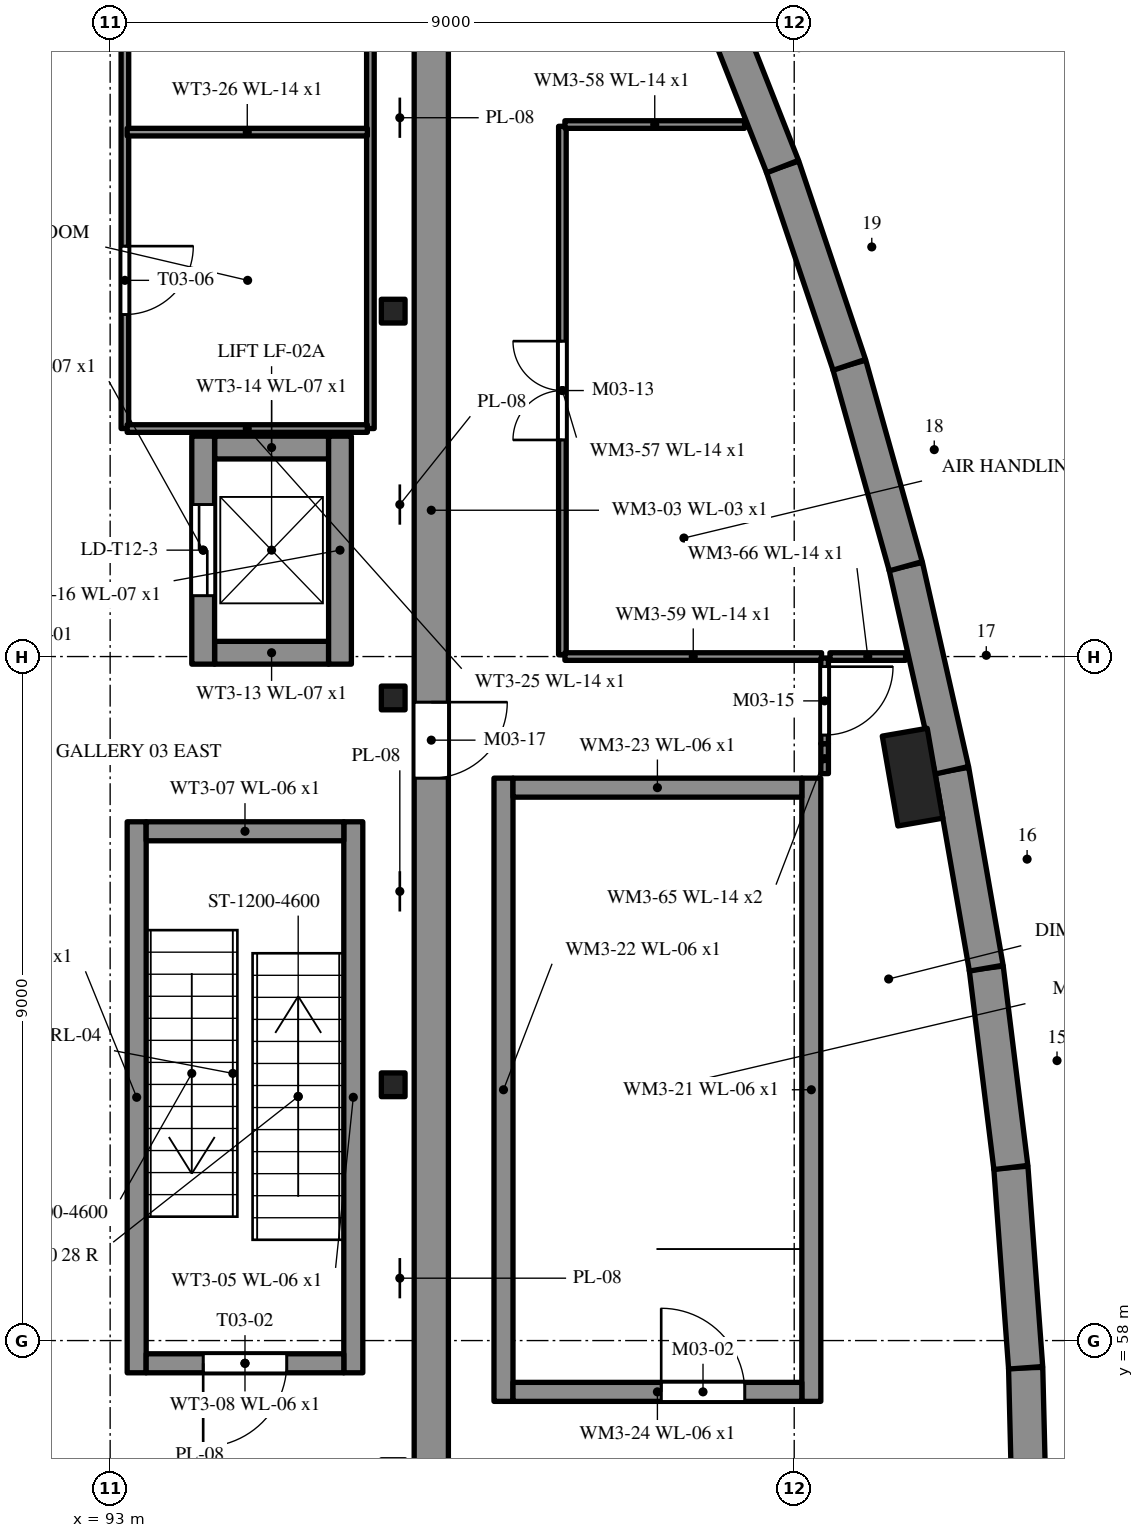
"""IFC4 building model, lengths in metres.
Left out: names, types, materials, properties, quantities, classifications, styles, units other than length and angle.
Written with IfcOpenShell. Run it as: python <this file> out.ifc"""

import sys

from ifc_helpers import new_model, si_unit, direction, frame, frame_2d, origin, origin_2d, place, context, subcontext, project, spatial, polyline, rectangle, i_section, outline, extrude, element, fill, save


model = new_model("IFC4")
c1 = context("Model", 3, precision=1e-05, world=origin(), true_north=direction((0.0, 1.0)))
c2 = subcontext(c1, "Body", "Model", "MODEL_VIEW")
j1 = project(units=[si_unit("LENGTHUNIT", "METRE"), si_unit("PLANEANGLEUNIT", "RADIAN")], contexts=[c1])
p1 = place(None, origin())
s1 = spatial("IfcSite", under=j1, at=p1, CompositionType="ELEMENT")
p2 = place(p1, origin())
s2 = spatial("IfcBuilding", under=s1, at=p2, CompositionType="ELEMENT")
p3 = place(p2, frame((0.0, 0.0, 14.8)))
s3 = spatial("IfcBuildingStorey", under=s2, at=p3, CompositionType="ELEMENT", Elevation=14.8)
p4 = place(p3, frame((105.11, 55.0, 0.0), z_axis=(0.0, 0.0, 1.0), x_axis=(-0.024666736886, 0.999695729756, 0.0)))
e1 = element("IfcWall", 1, at=p4, inside=s3, PredefinedType="SOLIDWALL", context=c2, shape_type="SweptSolid", body=[
    extrude(outline(polyline([(0.0, 0.0), (2.643, 0.0), (2.643, 2.974), (2.62, 2.981), (0.059, 3.854), (0.0, 3.874), (0.0, 0.0)])), frame((0.0, 0.225, 0.0), z_axis=(0.0, -1.0, 0.0), x_axis=(1.0, 0.0, 0.0)), (0.0, 0.0, 1.0), 0.45),
])
p5 = place(p3, frame((105.045, 57.642, 0.0), z_axis=(0.0, 0.0, 1.0), x_axis=(-0.07363685767, 0.997285121313, 0.0)))
e2 = element("IfcWall", 2, at=p5, inside=s3, PredefinedType="SOLIDWALL", context=c2, shape_type="SweptSolid", body=[
    extrude(outline(polyline([(0.0, 0.0), (2.642, 0.0), (2.643, 2.069), (2.603, 2.083), (0.0, 2.97), (0.0, 0.0)])), frame((0.0, 0.225, 0.0), z_axis=(0.0, -1.0, 0.0), x_axis=(1.0, 0.0, 0.0)), (0.0, 0.0, 1.0), 0.45),
])
p6 = place(p3, frame((104.85, 60.277, 0.0), z_axis=(0.0, 0.0, 1.0), x_axis=(-0.122499610212, 0.992468561466, 0.0)))
e3 = element("IfcWall", 3, at=p6, inside=s3, PredefinedType="SOLIDWALL", context=c2, shape_type="SweptSolid", body=[
    extrude(outline(polyline([(0.0, 0.0), (2.643, 0.0), (2.643, 2.967), (2.585, 2.948), (0.087, 2.096), (0.0, 2.067), (0.0, 0.0)])), frame((0.0, 0.225, 0.0), z_axis=(0.0, -1.0, 0.0), x_axis=(1.0, 0.0, 0.0)), (0.0, 0.0, 1.0), 0.45),
])
p7 = place(p3, frame((104.527, 62.9, 0.0), z_axis=(0.0, 0.0, 1.0), x_axis=(-0.171196910379, 0.985236833394, 0.0)))
e4 = element("IfcWall", 4, at=p7, inside=s3, PredefinedType="SOLIDWALL", context=c2, shape_type="SweptSolid", body=[
    extrude(outline(polyline([(0.0, 0.0), (2.643, 0.0), (2.643, 3.832), (2.602, 3.856), (2.524, 3.83), (0.069, 2.994), (0.0, 2.97), (0.0, 0.0)])), frame((0.0, 0.225, 0.0), z_axis=(0.0, -1.0, 0.0), x_axis=(1.0, 0.0, 0.0)), (0.0, 0.0, 1.0), 0.45),
])
p8 = place(p3, frame((104.074, 65.503, 0.0), z_axis=(0.0, 0.0, 1.0), x_axis=(-0.220347996563, 0.975421324562, 0.0)))
e5 = element("IfcWall", 5, at=p8, inside=s3, PredefinedType="SOLIDWALL", context=c2, shape_type="SweptSolid", body=[
    extrude(outline(polyline([(0.0, 0.0), (2.752, 0.0), (2.752, 2.925), (2.733, 2.932), (0.131, 3.785), (0.08, 3.802), (0.0, 3.828), (0.0, 0.0)])), frame((0.0, 0.225, 0.0), z_axis=(0.0, -1.0, 0.0), x_axis=(1.0, 0.0, 0.0)), (0.0, 0.0, 1.0), 0.45),
])
p9 = place(p3, frame((103.468, 68.188, 0.0), z_axis=(0.0, 0.0, 1.0), x_axis=(-0.270008269196, 0.962858003324, 0.0)))
e6 = element("IfcWall", 6, at=p9, inside=s3, PredefinedType="SOLIDWALL", context=c2, shape_type="SweptSolid", body=[
    extrude(outline(polyline([(0.0, 0.0), (2.752, 0.0), (2.752, 2.027), (0.0, 2.921), (0.0, 0.0)])), frame((0.0, 0.225, 0.0), z_axis=(0.0, -1.0, 0.0), x_axis=(1.0, 0.0, 0.0)), (0.0, 0.0, 1.0), 0.45),
])
p10 = place(p3, frame((102.725, 70.838, 0.0), z_axis=(0.0, 0.0, 1.0), x_axis=(-0.318887614688, 0.947792534893, 0.0)))
e7 = element("IfcWall", 7, at=p10, inside=s3, PredefinedType="SOLIDWALL", context=c2, shape_type="SweptSolid", body=[
    extrude(outline(polyline([(0.0, 0.0), (2.752, 0.0), (2.752, 2.928), (2.639, 2.894), (0.152, 2.081), (0.0, 2.031), (0.0, 0.0)])), frame((0.0, 0.225, 0.0), z_axis=(0.0, -1.0, 0.0), x_axis=(1.0, 0.0, 0.0)), (0.0, 0.0, 1.0), 0.45),
])
p11 = place(p3, frame((101.847, 73.447, 0.0), z_axis=(0.0, 0.0, 1.0), x_axis=(-0.366920100653, 0.930252460215, 0.0)))
e8 = element("IfcWall", 8, at=p11, inside=s3, PredefinedType="SOLIDWALL", context=c2, shape_type="SweptSolid", body=[
    extrude(outline(polyline([(0.0, 0.0), (2.752, 0.0), (2.752, 3.742), (2.736, 3.747), (2.647, 3.797), (2.558, 3.768), (0.128, 2.973), (0.0, 2.931), (0.0, 0.0)])), frame((0.0, 0.225, 0.0), z_axis=(0.0, -1.0, 0.0), x_axis=(1.0, 0.0, 0.0)), (0.0, 0.0, 1.0), 0.45),
])
p12 = place(p3, frame((97.225, 55.4, 0.0), z_axis=(0.0, 0.0, 1.0), x_axis=(0.0, 1.0, 0.0)))
e9 = element("IfcWall", 9, at=p12, inside=s3, PredefinedType="SOLIDWALL", context=c2, shape_type="SweptSolid", body=[
    extrude(rectangle(XDim=27.05, YDim=0.45, at=frame_2d((13.525, 0.0))), origin(), (0.0, 0.0, 1.0), 4.6),
])
p13 = place(p12, frame((10.0, 0.0, 0.0)))
e10 = element("IfcOpeningElement", 10, at=p13, cuts=e9, PredefinedType="OPENING", context=c2, shape_type="SweptSolid", body=[
    extrude(rectangle(XDim=1.0, YDim=2.1, at=frame_2d((0.5, 1.05))), frame((0.0, 0.235, 0.0), z_axis=(0.0, -1.0, 0.0), x_axis=(1.0, 0.0, 0.0)), (0.0, 0.0, 1.0), 0.47),
])
p14 = place(p3, frame((103.557, 65.414, 0.0), z_axis=(0.0, 0.0, 1.0), x_axis=(-0.171172540003, 0.985241067734, 0.0)))
e11 = element("IfcColumn", 11, at=p14, inside=s3, PredefinedType="PILASTER", context=c2, shape_type="SweptSolid", body=[
    extrude(rectangle(XDim=1.2, YDim=0.6, at=origin_2d()), origin(), (0.0, 0.0, 1.0), 3.071),
])
for number, where, z_axis, x_axis in (
    (12, (102.225, 57.2, 0.0), (0.0, 0.0, 1.0), (0.0, 1.0, 0.0)),
    (13, (98.175, 65.4, 0.0), (0.0, 0.0, 1.0), (0.0, -1.0, 0.0)),
):
    element("IfcWall", number, at=place(p3, frame(where, z_axis=z_axis, x_axis=x_axis)), inside=s3, PredefinedType="SHEAR", context=c2, shape_type="SweptSolid", body=[
        extrude(rectangle(XDim=8.2, YDim=0.25, at=frame_2d((4.1, 0.0))), origin(), (0.0, 0.0, 1.0), 3.294),
    ])
p15 = place(p3, frame((98.3, 65.275, 0.0), z_axis=(0.0, 0.0, 1.0), x_axis=(1.0, 0.0, 0.0)))
e14 = element("IfcWall", 14, at=p15, inside=s3, PredefinedType="SHEAR", context=c2, shape_type="SweptSolid", body=[
    extrude(rectangle(XDim=3.8, YDim=0.25, at=frame_2d((1.9, 0.0))), origin(), (0.0, 0.0, 1.0), 3.294),
])
p16 = place(p3, frame((102.1, 57.325, 0.0), z_axis=(0.0, 0.0, 1.0), x_axis=(-1.0, 0.0, 0.0)))
e15 = element("IfcWall", 15, at=p16, inside=s3, PredefinedType="SHEAR", context=c2, shape_type="SweptSolid", body=[
    extrude(rectangle(XDim=3.8, YDim=0.25, at=frame_2d((1.9, 0.0))), origin(), (0.0, 0.0, 1.0), 3.294),
])
p17 = place(p16, frame((0.75, 0.0, 0.0)))
e16 = element("IfcOpeningElement", 16, at=p17, cuts=e15, PredefinedType="OPENING", context=c2, shape_type="SweptSolid", body=[
    extrude(rectangle(XDim=1.1, YDim=2.1, at=frame_2d((0.55, 1.05))), frame((0.0, 0.135, 0.0), z_axis=(0.0, -1.0, 0.0), x_axis=(1.0, 0.0, 0.0)), (0.0, 0.0, 1.0), 0.27),
])
for number, where, z_axis, x_axis in (
    (17, (96.724, 61.365, 0.0), (0.0, 0.0, 1.0), (1.0, 0.0, 0.0)),
    (18, (96.724, 66.455, 0.0), (0.0, 0.0, 1.0), (1.0, 0.0, 0.0)),
    (19, (96.724, 71.545, 0.0), (0.0, 0.0, 1.0), (1.0, 0.0, 0.0)),
):
    element("IfcColumn", number, at=place(p3, frame(where, z_axis=z_axis, x_axis=x_axis)), inside=s3, PredefinedType="COLUMN", context=c2, shape_type="SweptSolid", body=[
        extrude(i_section(OverallWidth=0.312, OverallDepth=0.312, WebThickness=0.017, FlangeThickness=0.017, FilletRadius=0.016, at=origin_2d()), origin(), (0.0, 0.0, 1.0), 4.6),
    ])
for number, where, z_axis, x_axis in (
    (20, (96.199, 57.576, 0.0), (0.0, 0.0, 1.0), (0.0, 1.0, 0.0)),
    (21, (93.349, 64.826, 0.0), (0.0, 0.0, 1.0), (0.0, -1.0, 0.0)),
):
    element("IfcWall", number, at=place(p3, frame(where, z_axis=z_axis, x_axis=x_axis)), inside=s3, PredefinedType="SHEAR", context=c2, shape_type="SweptSolid", body=[
        extrude(rectangle(XDim=7.25, YDim=0.25, at=frame_2d((3.625, 0.0))), origin(), (0.0, 0.0, 1.0), 4.6),
    ])
p18 = place(p3, frame((93.474, 64.701, 0.0), z_axis=(0.0, 0.0, 1.0), x_axis=(1.0, 0.0, 0.0)))
e22 = element("IfcWall", 22, at=p18, inside=s3, PredefinedType="SHEAR", context=c2, shape_type="SweptSolid", body=[
    extrude(rectangle(XDim=2.6, YDim=0.25, at=frame_2d((1.3, 0.0))), origin(), (0.0, 0.0, 1.0), 4.6),
])
p19 = place(p3, frame((96.074, 57.701, 0.0), z_axis=(0.0, 0.0, 1.0), x_axis=(-1.0, 0.0, 0.0)))
e23 = element("IfcWall", 23, at=p19, inside=s3, PredefinedType="SHEAR", context=c2, shape_type="SweptSolid", body=[
    extrude(rectangle(XDim=2.6, YDim=0.25, at=frame_2d((1.3, 0.0))), origin(), (0.0, 0.0, 1.0), 4.6),
])
p20 = place(p19, frame((0.75, 0.0, 0.0)))
e24 = element("IfcOpeningElement", 24, at=p20, cuts=e23, PredefinedType="OPENING", context=c2, shape_type="SweptSolid", body=[
    extrude(rectangle(XDim=1.1, YDim=2.1, at=frame_2d((0.55, 1.05))), frame((0.0, 0.135, 0.0), z_axis=(0.0, -1.0, 0.0), x_axis=(1.0, 0.0, 0.0)), (0.0, 0.0, 1.0), 0.27),
])
for number, where, z_axis, x_axis in (
    (25, (94.374, 67.05, 0.0), (0.0, 0.0, 1.0), (1.0, 0.0, 0.0)),
    (26, (95.874, 69.75, 0.0), (0.0, 0.0, 1.0), (-1.0, 0.0, 0.0)),
):
    element("IfcWall", number, at=place(p3, frame(where, z_axis=z_axis, x_axis=x_axis)), inside=s3, PredefinedType="SHEAR", context=c2, shape_type="SweptSolid", body=[
        extrude(rectangle(XDim=1.5, YDim=0.3, at=frame_2d((0.75, 0.0))), origin(), (0.0, 0.0, 1.0), 4.6),
    ])
p21 = place(p3, frame((94.224, 66.9, 0.0), z_axis=(0.0, 0.0, 1.0), x_axis=(0.0, 1.0, 0.0)))
e27 = element("IfcWall", 27, at=p21, inside=s3, PredefinedType="SHEAR", context=c2, shape_type="SweptSolid", body=[
    extrude(rectangle(XDim=3.0, YDim=0.3, at=frame_2d((1.5, 0.0))), origin(), (0.0, 0.0, 1.0), 4.6),
])
p22 = place(p21, frame((0.9, 0.0, 0.0)))
e28 = element("IfcOpeningElement", 28, at=p22, cuts=e27, PredefinedType="OPENING", context=c2, shape_type="SweptSolid", body=[
    extrude(rectangle(XDim=1.2, YDim=2.2, at=frame_2d((0.6, 1.1))), frame((0.0, 0.16, 0.0), z_axis=(0.0, -1.0, 0.0), x_axis=(1.0, 0.0, 0.0)), (0.0, 0.0, 1.0), 0.32),
])
p23 = place(p3, frame((96.024, 66.9, 0.0), z_axis=(0.0, 0.0, 1.0), x_axis=(0.0, 1.0, 0.0)))
e29 = element("IfcWall", 29, at=p23, inside=s3, PredefinedType="SHEAR", context=c2, shape_type="SweptSolid", body=[
    extrude(rectangle(XDim=3.0, YDim=0.3, at=frame_2d((1.5, 0.0))), origin(), (0.0, 0.0, 1.0), 4.6),
])
p24 = place(p3, frame((96.424, 70.0, 0.0), z_axis=(0.0, 0.0, 1.0), x_axis=(0.0, 1.0, 0.0)))
e30 = element("IfcWall", 30, at=p24, inside=s3, PredefinedType="PARTITIONING", context=c2, shape_type="SweptSolid", body=[
    extrude(rectangle(XDim=11.644, YDim=0.1, at=frame_2d((5.822, 0.0))), origin(), (0.0, 0.0, 1.0), 4.04),
])
p25 = place(p3, frame((93.194, 70.0, 0.0), z_axis=(0.0, 0.0, 1.0), x_axis=(0.0, 1.0, 0.0)))
e31 = element("IfcWall", 31, at=p25, inside=s3, PredefinedType="PARTITIONING", context=c2, shape_type="SweptSolid", body=[
    extrude(rectangle(XDim=11.644, YDim=0.1, at=frame_2d((5.822, 0.0))), origin(), (0.0, 0.0, 1.0), 4.04),
])
p26 = place(p25, frame((1.5, 0.0, 0.0)))
e32 = element("IfcOpeningElement", 32, at=p26, cuts=e31, PredefinedType="OPENING", context=c2, shape_type="SweptSolid", body=[
    extrude(rectangle(XDim=0.9, YDim=2.1, at=frame_2d((0.45, 1.05))), frame((0.0, 0.06, 0.0), z_axis=(0.0, -1.0, 0.0), x_axis=(1.0, 0.0, 0.0)), (0.0, 0.0, 1.0), 0.12),
])
p27 = place(p25, frame((5.4, 0.0, 0.0)))
e33 = element("IfcOpeningElement", 33, at=p27, cuts=e31, PredefinedType="OPENING", context=c2, shape_type="SweptSolid", body=[
    extrude(rectangle(XDim=0.9, YDim=2.1, at=frame_2d((0.45, 1.05))), frame((0.0, 0.06, 0.0), z_axis=(0.0, -1.0, 0.0), x_axis=(1.0, 0.0, 0.0)), (0.0, 0.0, 1.0), 0.12),
])
p28 = place(p25, frame((9.272, 0.0, 0.0)))
e34 = element("IfcOpeningElement", 34, at=p28, cuts=e31, PredefinedType="OPENING", context=c2, shape_type="SweptSolid", body=[
    extrude(rectangle(XDim=0.9, YDim=2.1, at=frame_2d((0.45, 1.05))), frame((0.0, 0.06, 0.0), z_axis=(0.0, -1.0, 0.0), x_axis=(1.0, 0.0, 0.0)), (0.0, 0.0, 1.0), 0.12),
])
for number, where, z_axis, x_axis in (
    (35, (96.384, 70.0, 0.0), (0.0, 0.0, 1.0), (-1.0, 0.0, 0.0)),
    (36, (96.384, 73.9, 0.0), (0.0, 0.0, 1.0), (-1.0, 0.0, 0.0)),
):
    element("IfcWall", number, at=place(p3, frame(where, z_axis=z_axis, x_axis=x_axis)), inside=s3, PredefinedType="PARTITIONING", context=c2, shape_type="SweptSolid", body=[
        extrude(rectangle(XDim=3.16, YDim=0.1, at=frame_2d((1.58, 0.0))), origin(), (0.0, 0.0, 1.0), 4.04),
    ])
p29 = place(p3, frame((98.95, 67.023, 0.0), z_axis=(0.0, 0.0, 1.0), x_axis=(0.0, 1.0, 0.0)))
e37 = element("IfcWall", 37, at=p29, inside=s3, PredefinedType="PARTITIONING", context=c2, shape_type="SweptSolid", body=[
    extrude(outline(polyline([(0.0, 0.0), (6.954, 0.0), (6.954, 4.952), (6.696, 4.923), (6.439, 4.89), (6.181, 4.858), (5.924, 4.825), (5.666, 4.792), (5.408, 4.76), (5.151, 4.727), (4.893, 4.694), (4.636, 4.668), (4.378, 4.644), (4.121, 4.619), (3.863, 4.595), (3.606, 4.57), (3.348, 4.546), (3.091, 4.522), (2.833, 4.497), (2.575, 4.564), (2.318, 4.687), (2.06, 4.81), (1.803, 4.934), (1.545, 5.057), (1.288, 5.18), (1.03, 5.303), (0.773, 5.426), (0.515, 5.55), (0.258, 5.666), (0.0, 5.781), (0.0, 0.0)])), frame((0.0, 0.05, 0.0), z_axis=(0.0, -1.0, 0.0), x_axis=(1.0, 0.0, 0.0)), (0.0, 0.0, 1.0), 0.1),
])
p30 = place(p29, frame((2.827, 0.0, 0.0)))
e38 = element("IfcOpeningElement", 38, at=p30, cuts=e37, PredefinedType="OPENING", context=c2, shape_type="SweptSolid", body=[
    extrude(rectangle(XDim=1.3, YDim=2.1, at=frame_2d((0.65, 1.05))), frame((0.0, 0.06, 0.0), z_axis=(0.0, -1.0, 0.0), x_axis=(1.0, 0.0, 0.0)), (0.0, 0.0, 1.0), 0.12),
])
p31 = place(p3, frame((98.983, 74.0, 0.0), z_axis=(0.0, 0.0, 1.0), x_axis=(1.0, 0.0, 0.0)))
e39 = element("IfcWall", 39, at=p31, inside=s3, PredefinedType="PARTITIONING", context=c2, shape_type="SweptSolid", body=[
    extrude(outline(polyline([(0.0, 0.0), (2.364, 0.0), (2.374, 3.389), (2.11, 3.561), (1.846, 3.733), (1.583, 3.906), (1.319, 4.078), (1.055, 4.25), (0.791, 4.422), (0.528, 4.595), (0.264, 4.767), (0.0, 4.939), (0.0, 0.0)])), frame((0.0, 0.05, 0.0), z_axis=(0.0, -1.0, 0.0), x_axis=(1.0, 0.0, 0.0)), (0.0, 0.0, 1.0), 0.1),
])
p32 = place(p3, frame((102.36, 67.0, 0.0), z_axis=(0.0, 0.0, 1.0), x_axis=(-1.0, 0.0, 0.0)))
e40 = element("IfcWall", 40, at=p32, inside=s3, PredefinedType="PARTITIONING", context=c2, shape_type="SweptSolid", body=[
    extrude(outline(polyline([(0.0, 0.0), (3.377, 0.0), (3.447, 5.78), (3.182, 5.648), (2.917, 5.516), (2.651, 5.384), (2.386, 5.252), (2.121, 5.119), (1.856, 4.987), (1.591, 4.855), (1.326, 4.723), (1.061, 4.591), (0.795, 4.459), (0.53, 4.327), (0.265, 4.195), (0.0, 4.063), (0.0, 0.0)])), frame((0.0, 0.05, 0.0), z_axis=(0.0, -1.0, 0.0), x_axis=(1.0, 0.0, 0.0)), (0.0, 0.0, 1.0), 0.1),
])
p33 = place(p3, frame((102.4, 65.46, 0.0), z_axis=(0.0, 0.0, 1.0), x_axis=(0.0, 1.0, 0.0)))
e41 = element("IfcWall", 41, at=p33, inside=s3, PredefinedType="PARTITIONING", context=c2, shape_type="SweptSolid", body=[
    extrude(rectangle(XDim=0.394, YDim=0.1, at=frame_2d((0.197, 0.0))), origin(), (0.0, 0.0, 1.0), 1.996),
])
p34 = place(p3, frame((102.4, 65.854, 0.0), z_axis=(0.0, 0.0, 1.0), x_axis=(0.0, 1.0, 0.0)))
e42 = element("IfcWall", 42, at=p34, inside=s3, PredefinedType="PARTITIONING", context=c2, shape_type="SweptSolid", body=[
    extrude(outline(polyline([(0.0, 0.0), (1.126, 0.0), (1.127, 4.082), (0.845, 4.208), (0.563, 4.334), (0.282, 4.46), (0.0, 4.586), (0.0, 0.0)])), frame((0.0, 0.05, 0.0), z_axis=(0.0, -1.0, 0.0), x_axis=(1.0, 0.0, 0.0)), (0.0, 0.0, 1.0), 0.1),
])
p35 = place(p34, frame((0.113, 0.0, 0.0)))
e43 = element("IfcOpeningElement", 43, at=p35, cuts=e42, PredefinedType="OPENING", context=c2, shape_type="SweptSolid", body=[
    extrude(rectangle(XDim=0.9, YDim=2.1, at=frame_2d((0.45, 1.05))), frame((0.0, 0.06, 0.0), z_axis=(0.0, -1.0, 0.0), x_axis=(1.0, 0.0, 0.0)), (0.0, 0.0, 1.0), 0.12),
])
p36 = place(p3, frame((103.465, 67.0, 0.0), z_axis=(0.0, 0.0, 1.0), x_axis=(-1.0, 0.0, 0.0)))
e44 = element("IfcWall", 44, at=p36, inside=s3, PredefinedType="PARTITIONING", context=c2, shape_type="SweptSolid", body=[
    extrude(outline(polyline([(0.0, 0.0), (0.995, 0.0), (0.995, 4.038), (0.664, 3.873), (0.332, 3.708), (0.0, 3.542), (0.0, 0.0)])), frame((0.0, 0.05, 0.0), z_axis=(0.0, -1.0, 0.0), x_axis=(1.0, 0.0, 0.0)), (0.0, 0.0, 1.0), 0.1),
])
p37 = place(p17, frame((1.1, 0.0, 0.0), z_axis=(0.0, 0.0, 1.0), x_axis=(-1.0, 0.0, 0.0)))
e45 = element("IfcDoor", 45, at=p37, inside=s3, OperationType="SINGLE_SWING_LEFT", PredefinedType="DOOR", context=c2, shape_type="SweptSolid", body=[
    extrude(rectangle(XDim=1.1, YDim=2.1, at=frame_2d((0.55, 1.05))), frame((0.0, 0.025, 0.0), z_axis=(0.0, -1.0, 0.0), x_axis=(1.0, 0.0, 0.0)), (0.0, 0.0, 1.0), 0.05),
])
fill(e16, e45)
p38 = place(p20, origin())
e46 = element("IfcDoor", 46, at=p38, inside=s3, OperationType="SINGLE_SWING_RIGHT", PredefinedType="DOOR", context=c2, shape_type="SweptSolid", body=[
    extrude(rectangle(XDim=1.1, YDim=2.1, at=frame_2d((0.55, 1.05))), frame((0.0, 0.025, 0.0), z_axis=(0.0, -1.0, 0.0), x_axis=(1.0, 0.0, 0.0)), (0.0, 0.0, 1.0), 0.05),
])
fill(e24, e46)
p39 = place(p22, origin())
e47 = element("IfcDoor", 47, at=p39, inside=s3, OperationType="SLIDING_TO_LEFT", PredefinedType="DOOR", context=c2, shape_type="SweptSolid", body=[
    extrude(rectangle(XDim=1.2, YDim=2.2, at=frame_2d((0.6, 1.1))), frame((0.0, 0.025, 0.0), z_axis=(0.0, -1.0, 0.0), x_axis=(1.0, 0.0, 0.0)), (0.0, 0.0, 1.0), 0.05),
])
fill(e28, e47)
p40 = place(p26, frame((0.9, 0.0, 0.0), z_axis=(0.0, 0.0, 1.0), x_axis=(-1.0, 0.0, 0.0)))
e48 = element("IfcDoor", 48, at=p40, inside=s3, OperationType="SINGLE_SWING_LEFT", PredefinedType="DOOR", context=c2, shape_type="SweptSolid", body=[
    extrude(rectangle(XDim=0.9, YDim=2.1, at=frame_2d((0.45, 1.05))), frame((0.0, 0.025, 0.0), z_axis=(0.0, -1.0, 0.0), x_axis=(1.0, 0.0, 0.0)), (0.0, 0.0, 1.0), 0.05),
])
fill(e32, e48)
p41 = place(p30, origin())
e49 = element("IfcDoor", 49, at=p41, inside=s3, OperationType="DOUBLE_DOOR_SINGLE_SWING", PredefinedType="DOOR", context=c2, shape_type="SweptSolid", body=[
    extrude(rectangle(XDim=1.3, YDim=2.1, at=frame_2d((0.65, 1.05))), frame((0.0, 0.025, 0.0), z_axis=(0.0, -1.0, 0.0), x_axis=(1.0, 0.0, 0.0)), (0.0, 0.0, 1.0), 0.05),
])
fill(e38, e49)
p42 = place(p35, frame((0.9, 0.0, 0.0), z_axis=(0.0, 0.0, 1.0), x_axis=(-1.0, 0.0, 0.0)))
e50 = element("IfcDoor", 50, at=p42, inside=s3, OperationType="SINGLE_SWING_LEFT", PredefinedType="DOOR", context=c2, shape_type="SweptSolid", body=[
    extrude(rectangle(XDim=0.9, YDim=2.1, at=frame_2d((0.45, 1.05))), frame((0.0, 0.025, 0.0), z_axis=(0.0, -1.0, 0.0), x_axis=(1.0, 0.0, 0.0)), (0.0, 0.0, 1.0), 0.05),
])
fill(e43, e50)
p43 = place(p13, frame((1.0, 0.0, 0.0), z_axis=(0.0, 0.0, 1.0), x_axis=(-1.0, 0.0, 0.0)))
e51 = element("IfcDoor", 51, at=p43, inside=s3, OperationType="SINGLE_SWING_LEFT", PredefinedType="DOOR", context=c2, shape_type="SweptSolid", body=[
    extrude(rectangle(XDim=1.0, YDim=2.1, at=frame_2d((0.5, 1.05))), frame((0.0, 0.025, 0.0), z_axis=(0.0, -1.0, 0.0), x_axis=(1.0, 0.0, 0.0)), (0.0, 0.0, 1.0), 0.05),
])
fill(e10, e51)
save(model, sys.argv[1])
